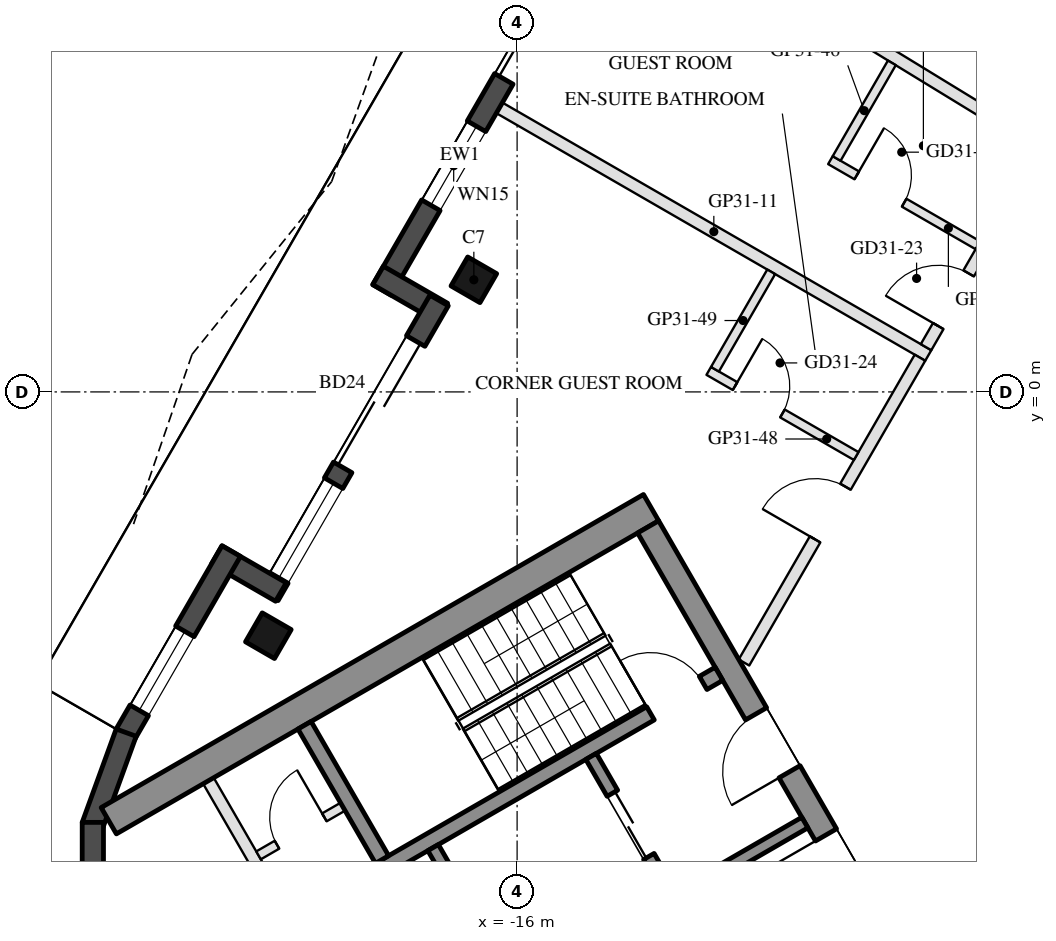
"""IFC4 building model, lengths in metres.
Left out: names, types, materials, properties, quantities, classifications, styles, units other than length and angle.
Written with IfcOpenShell. Run it as: python <this file> out.ifc"""

import sys

from ifc_helpers import new_model, si_unit, direction, frame, frame_2d, origin, origin_2d, place, context, subcontext, project, spatial, rectangle, hollow_rectangle, extrude, boolean, halfspace, element, fill, save


model = new_model("IFC4")
c1 = context("Model", 3, precision=1e-05, world=origin(), true_north=direction((0.0, 1.0)))
c2 = subcontext(c1, "Body", "Model", "MODEL_VIEW")
j1 = project(units=[si_unit("LENGTHUNIT", "METRE"), si_unit("PLANEANGLEUNIT", "RADIAN")], contexts=[c1])
p1 = place(None, origin())
s1 = spatial("IfcSite", under=j1, at=p1, CompositionType="ELEMENT")
p2 = place(p1, origin())
s2 = spatial("IfcBuilding", under=s1, at=p2, CompositionType="ELEMENT")
p3 = place(p2, frame((0.0, 0.0, 302.2)))
s3 = spatial("IfcBuildingStorey", under=s2, at=p3, CompositionType="ELEMENT", Elevation=302.2)
p4 = place(p3, frame((-16.711, 1.844, 0.0), z_axis=(0.0, 0.0, 1.0), x_axis=(0.5, 0.866025403784, 0.0)))
e1 = element("IfcColumn", 1, at=p4, inside=s3, PredefinedType="COLUMN", context=c2, shape_type="SweptSolid", body=[
    boolean("DIFFERENCE", extrude(hollow_rectangle(XDim=0.55, YDim=0.55, WallThickness=0.025, at=origin_2d()), origin(), (0.0, 0.0, 1.0), 3.7), halfspace(frame((0.0, 0.0, 0.034), z_axis=(0.0, 0.0, 1.0), x_axis=(1.0, 0.0, 0.0)), True)),
])
p5 = place(p3, frame((-20.091, -4.01, 0.0), z_axis=(0.0, 0.0, 1.0), x_axis=(0.5, 0.866025403784, 0.0)))
e2 = element("IfcColumn", 2, at=p5, inside=s3, PredefinedType="COLUMN", context=c2, shape_type="SweptSolid", body=[
    boolean("DIFFERENCE", extrude(hollow_rectangle(XDim=0.55, YDim=0.55, WallThickness=0.025, at=origin_2d()), origin(), (0.0, 0.0, 1.0), 3.7), halfspace(frame((0.0, 0.0, 0.04), z_axis=(0.0, 0.0, 1.0), x_axis=(1.0, 0.0, 0.0)), True)),
])
p6 = place(p3, frame((-13.943, 9.089, 0.0), z_axis=(0.0, 0.0, 1.0), x_axis=(-0.500013816581, -0.866017426631, 0.0)))
e3 = element("IfcWall", 3, at=p6, inside=s3, PredefinedType="SOLIDWALL", context=c2, shape_type="SweptSolid", body=[
    extrude(rectangle(XDim=8.559, YDim=0.35, at=frame_2d((4.279, 0.0))), origin(), (0.0, 0.0, 1.0), 3.55),
])
p7 = place(p6, frame((2.75, 0.0, 0.0)))
e4 = element("IfcOpeningElement", 4, at=p7, cuts=e3, PredefinedType="OPENING", context=c2, shape_type="SweptSolid", body=[
    extrude(rectangle(XDim=1.8, YDim=2.4, at=frame_2d((0.9, 1.2))), frame((0.0, 0.185, 0.0), z_axis=(0.0, -1.0, 0.0), x_axis=(1.0, 0.0, 0.0)), (0.0, 0.0, 1.0), 0.37),
])
p8 = place(p6, frame((1.525, 0.0, 0.3)))
e5 = element("IfcOpeningElement", 5, at=p8, cuts=e3, PredefinedType="OPENING", context=c2, shape_type="SweptSolid", body=[
    extrude(rectangle(XDim=0.9, YDim=2.65, at=frame_2d((0.45, 1.325))), frame((0.0, 0.185, 0.0), z_axis=(0.0, -1.0, 0.0), x_axis=(1.0, 0.0, 0.0)), (0.0, 0.0, 1.0), 0.37),
])
p9 = place(p6, frame((5.45, 0.0, 0.3)))
e6 = element("IfcOpeningElement", 6, at=p9, cuts=e3, PredefinedType="OPENING", context=c2, shape_type="SweptSolid", body=[
    extrude(rectangle(XDim=1.5, YDim=2.65, at=frame_2d((0.75, 1.325))), frame((0.0, 0.185, 0.0), z_axis=(0.0, -1.0, 0.0), x_axis=(1.0, 0.0, 0.0)), (0.0, 0.0, 1.0), 0.37),
])
p10 = place(p3, frame((-18.287, 1.916, 0.0), z_axis=(0.0, 0.0, 1.0), x_axis=(0.866142280446, -0.499797509021, 0.0)))
e7 = element("IfcWall", 7, at=p10, inside=s3, PredefinedType="SOLIDWALL", context=c2, shape_type="SweptSolid", body=[
    extrude(rectangle(XDim=1.22, YDim=0.35, at=frame_2d((0.61, 0.0))), origin(), (0.0, 0.0, 1.0), 3.55),
])
p11 = place(p3, frame((-17.283, 1.504, 0.0), z_axis=(0.0, 0.0, 1.0), x_axis=(-0.500008054862, -0.866020753258, 0.0)))
e8 = element("IfcWall", 8, at=p11, inside=s3, PredefinedType="SOLIDWALL", context=c2, shape_type="SweptSolid", body=[
    extrude(rectangle(XDim=5.599, YDim=0.35, at=frame_2d((2.8, 0.0))), origin(), (0.0, 0.0, 1.0), 3.55),
])
p12 = place(p11, frame((0.77, 0.0, 0.0)))
e9 = element("IfcOpeningElement", 9, at=p12, cuts=e8, PredefinedType="OPENING", context=c2, shape_type="SweptSolid", body=[
    extrude(rectangle(XDim=2.4, YDim=2.4, at=frame_2d((1.2, 1.2))), frame((0.0, 0.185, 0.0), z_axis=(0.0, -1.0, 0.0), x_axis=(1.0, 0.0, 0.0)), (0.0, 0.0, 1.0), 0.37),
])
p13 = place(p11, frame((3.47, 0.0, 0.3)))
e10 = element("IfcOpeningElement", 10, at=p13, cuts=e8, PredefinedType="OPENING", context=c2, shape_type="SweptSolid", body=[
    extrude(rectangle(XDim=1.8, YDim=2.65, at=frame_2d((0.9, 1.325))), frame((0.0, 0.185, 0.0), z_axis=(0.0, -1.0, 0.0), x_axis=(1.0, 0.0, 0.0)), (0.0, 0.0, 1.0), 0.37),
])
p14 = place(p3, frame((-19.884, -3.292, 0.0), z_axis=(0.0, 0.0, 1.0), x_axis=(-0.866005645448, 0.500034220881, 0.0)))
e11 = element("IfcWall", 11, at=p14, inside=s3, PredefinedType="SOLIDWALL", context=c2, shape_type="SweptSolid", body=[
    extrude(rectangle(XDim=1.22, YDim=0.35, at=frame_2d((0.61, 0.0))), origin(), (0.0, 0.0, 1.0), 3.55),
])
p15 = place(p3, frame((-20.702, -2.618, 0.0), z_axis=(0.0, 0.0, 1.0), x_axis=(-0.499979528911, -0.866037222451, 0.0)))
e12 = element("IfcWall", 12, at=p15, inside=s3, PredefinedType="SOLIDWALL", context=c2, shape_type="SweptSolid", body=[
    extrude(rectangle(XDim=3.48, YDim=0.35, at=frame_2d((1.74, 0.0))), origin(), (0.0, 0.0, 1.0), 3.55),
])
p16 = place(p15, frame((1.525, 0.0, 0.3)))
e13 = element("IfcOpeningElement", 13, at=p16, cuts=e12, PredefinedType="OPENING", context=c2, shape_type="SweptSolid", body=[
    extrude(rectangle(XDim=1.5, YDim=2.65, at=frame_2d((0.75, 1.325))), frame((0.0, 0.185, 0.0), z_axis=(0.0, -1.0, 0.0), x_axis=(1.0, 0.0, 0.0)), (0.0, 0.0, 1.0), 0.37),
])
for number, where, z_axis, x_axis in (
    (14, (-22.429, -5.604, 0.0), (0.0, 0.0, 1.0), (-0.342, -0.94, 0.0)),
    (15, (-22.977, -7.08, 0.0), (0.0, 0.0, 1.0), (0.0, -1.0, 0.0)),
):
    element("IfcWall", number, at=place(p3, frame(where, z_axis=z_axis, x_axis=x_axis)), inside=s3, PredefinedType="SOLIDWALL", context=c2, shape_type="SweptSolid", body=[
        extrude(rectangle(XDim=1.634, YDim=0.35, at=frame_2d((0.817, 0.0))), origin(), (0.0, 0.0, 1.0), 3.55),
    ])
p17 = place(p3, frame((-13.797, -1.903, 0.0), z_axis=(0.0, 0.0, 1.0), x_axis=(-0.866027279078, -0.499996751883, 0.0)))
e16 = element("IfcWall", 16, at=p17, inside=s3, PredefinedType="SHEAR", context=c2, shape_type="SweptSolid", body=[
    extrude(rectangle(XDim=10.298, YDim=0.5, at=frame_2d((5.149, 0.0))), origin(), (0.0, 0.0, 1.0), 3.5),
])
p18 = place(p3, frame((-13.845, -2.22, 0.0), z_axis=(0.0, 0.0, 1.0), x_axis=(0.500004234368, -0.866022959057, 0.0)))
e17 = element("IfcWall", 17, at=p18, inside=s3, PredefinedType="SHEAR", context=c2, shape_type="SweptSolid", body=[
    extrude(rectangle(XDim=10.0, YDim=0.4, at=frame_2d((5.0, 0.0))), origin(), (0.0, 0.0, 1.0), 3.5),
])
p19 = place(p18, frame((3.55, 0.0, 0.0)))
e18 = element("IfcOpeningElement", 18, at=p19, cuts=e17, PredefinedType="OPENING", context=c2, shape_type="SweptSolid", body=[
    extrude(rectangle(XDim=1.1, YDim=2.1, at=frame_2d((0.55, 1.05))), frame((0.0, 0.21, 0.0), z_axis=(0.0, -1.0, 0.0), x_axis=(1.0, 0.0, 0.0)), (0.0, 0.0, 1.0), 0.42),
])
p20 = place(p18, frame((5.85, 0.0, 0.0)))
e19 = element("IfcOpeningElement", 19, at=p20, cuts=e17, PredefinedType="OPENING", context=c2, shape_type="SweptSolid", body=[
    extrude(rectangle(XDim=1.4, YDim=2.1, at=frame_2d((0.7, 1.05))), frame((0.0, 0.21, 0.0), z_axis=(0.0, -1.0, 0.0), x_axis=(1.0, 0.0, 0.0)), (0.0, 0.0, 1.0), 0.42),
])
p21 = place(p3, frame((-12.681, -4.636, 0.0), z_axis=(0.0, 0.0, 1.0), x_axis=(-0.866021702275, -0.500006411147, 0.0)))
e20 = element("IfcWall", 20, at=p21, inside=s3, PredefinedType="SHEAR", context=c2, shape_type="SweptSolid", body=[
    extrude(rectangle(XDim=6.45, YDim=0.25, at=frame_2d((3.225, 0.0))), origin(), (0.0, 0.0, 1.0), 3.5),
])
p22 = place(p21, frame((0.3, 0.0, 0.0)))
e21 = element("IfcOpeningElement", 21, at=p22, cuts=e20, PredefinedType="OPENING", context=c2, shape_type="SweptSolid", body=[
    extrude(rectangle(XDim=1.0, YDim=2.1, at=frame_2d((0.5, 1.05))), frame((0.0, 0.135, 0.0), z_axis=(0.0, -1.0, 0.0), x_axis=(1.0, 0.0, 0.0)), (0.0, 0.0, 1.0), 0.27),
])
p23 = place(p3, frame((-19.496, -5.482, 0.0), z_axis=(0.0, 0.0, 1.0), x_axis=(0.499990435942, -0.866030925526, 0.0)))
e22 = element("IfcWall", 22, at=p23, inside=s3, PredefinedType="SHEAR", context=c2, shape_type="SweptSolid", body=[
    extrude(rectangle(XDim=2.55, YDim=0.25, at=frame_2d((1.275, 0.0))), origin(), (0.0, 0.0, 1.0), 3.5),
])
p24 = place(p3, frame((-17.381, -7.495, 0.0), z_axis=(0.0, 0.0, 1.0), x_axis=(0.500011755427, -0.866018616679, 0.0)))
e23 = element("IfcWall", 23, at=p24, inside=s3, PredefinedType="SHEAR", context=c2, shape_type="SweptSolid", body=[
    extrude(rectangle(XDim=2.8, YDim=0.2, at=frame_2d((1.4, 0.0))), origin(), (0.0, 0.0, 1.0), 3.5),
])
p25 = place(p3, frame((-14.783, -5.995, 0.0), z_axis=(0.0, 0.0, 1.0), x_axis=(0.49994636267, -0.866056369097, 0.0)))
e24 = element("IfcWall", 24, at=p25, inside=s3, PredefinedType="SHEAR", context=c2, shape_type="SweptSolid", body=[
    extrude(rectangle(XDim=2.8, YDim=0.2, at=frame_2d((1.4, 0.0))), origin(), (0.0, 0.0, 1.0), 3.5),
])
p26 = place(p25, frame((0.7, 0.0, 0.0)))
e25 = element("IfcOpeningElement", 25, at=p26, cuts=e24, PredefinedType="OPENING", context=c2, shape_type="SweptSolid", body=[
    extrude(rectangle(XDim=1.2, YDim=2.1, at=frame_2d((0.6, 1.05))), frame((0.0, 0.11, 0.0), z_axis=(0.0, -1.0, 0.0), x_axis=(1.0, 0.0, 0.0)), (0.0, 0.0, 1.0), 0.22),
])
p27 = place(p3, frame((-11.268, -7.083, 0.0), z_axis=(0.0, 0.0, 1.0), x_axis=(-0.866050077142, -0.499957262057, 0.0)))
e26 = element("IfcWall", 26, at=p27, inside=s3, PredefinedType="SHEAR", context=c2, shape_type="SweptSolid", body=[
    extrude(rectangle(XDim=2.4, YDim=0.2, at=frame_2d((1.2, 0.0))), origin(), (0.0, 0.0, 1.0), 3.5),
])
p28 = place(p3, frame((-21.076, -6.395, 0.0), z_axis=(0.0, 0.0, 1.0), x_axis=(0.50001468107, -0.866016927499, 0.0)))
e27 = element("IfcWall", 27, at=p28, inside=s3, PredefinedType="PARTITIONING", context=c2, shape_type="SweptSolid", body=[
    extrude(rectangle(XDim=5.4, YDim=0.2, at=frame_2d((2.7, 0.0))), origin(), (0.0, 0.0, 1.0), 3.5),
])
p29 = place(p28, frame((2.9, 0.0, 0.0)))
e28 = element("IfcOpeningElement", 28, at=p29, cuts=e27, PredefinedType="OPENING", context=c2, shape_type="SweptSolid", body=[
    extrude(rectangle(XDim=0.9, YDim=2.1, at=frame_2d((0.45, 1.05))), frame((0.0, 0.11, 0.0), z_axis=(0.0, -1.0, 0.0), x_axis=(1.0, 0.0, 0.0)), (0.0, 0.0, 1.0), 0.22),
])
p30 = place(p3, frame((-18.866, -6.822, 0.0), z_axis=(0.0, 0.0, 1.0), x_axis=(-0.866028054938, -0.499995408039, 0.0)))
e29 = element("IfcWall", 29, at=p30, inside=s3, PredefinedType="PARTITIONING", context=c2, shape_type="SweptSolid", body=[
    extrude(rectangle(XDim=1.6, YDim=0.15, at=frame_2d((0.8, 0.0))), origin(), (0.0, 0.0, 1.0), 3.5),
])
p31 = place(p30, frame((0.35, 0.0, 0.0)))
e30 = element("IfcOpeningElement", 30, at=p31, cuts=e29, PredefinedType="OPENING", context=c2, shape_type="SweptSolid", body=[
    extrude(rectangle(XDim=0.9, YDim=2.1, at=frame_2d((0.45, 1.05))), frame((0.0, 0.085, 0.0), z_axis=(0.0, -1.0, 0.0), x_axis=(1.0, 0.0, 0.0)), (0.0, 0.0, 1.0), 0.17),
])
p32 = place(p3, frame((-13.111, 7.531, 0.0), z_axis=(0.0, 0.0, 1.0), x_axis=(0.853158842711, -0.521651214034, 0.0)))
e31 = element("IfcWall", 31, at=p32, inside=s3, PredefinedType="PARTITIONING", context=c2, shape_type="SweptSolid", body=[
    extrude(rectangle(XDim=6.822, YDim=0.2, at=frame_2d((3.411, 0.0))), origin(), (0.0, 0.0, 1.0), 3.1),
])
p33 = place(p3, frame((-16.292, 4.672, 0.0), z_axis=(0.0, 0.0, 1.0), x_axis=(0.866028345359, -0.499994905008, 0.0)))
e32 = element("IfcWall", 32, at=p33, inside=s3, PredefinedType="PARTITIONING", context=c2, shape_type="SweptSolid", body=[
    extrude(rectangle(XDim=8.145, YDim=0.2, at=frame_2d((4.072, 0.0))), origin(), (0.0, 0.0, 1.0), 3.16),
])
p34 = place(p3, frame((-9.275, 0.736, 0.0), z_axis=(0.0, 0.0, 1.0), x_axis=(0.50002346599, 0.866011855265, 0.0)))
e33 = element("IfcWall", 33, at=p34, inside=s3, PredefinedType="PARTITIONING", context=c2, shape_type="SweptSolid", body=[
    extrude(rectangle(XDim=3.698, YDim=0.2, at=frame_2d((1.849, 0.0))), origin(), (0.0, 0.0, 1.0), 3.1),
])
p35 = place(p34, frame((0.401, 0.0, 0.0)))
e34 = element("IfcOpeningElement", 34, at=p35, cuts=e33, PredefinedType="OPENING", context=c2, shape_type="SweptSolid", body=[
    extrude(rectangle(XDim=1.0, YDim=2.1, at=frame_2d((0.5, 1.05))), frame((0.0, 0.11, 0.0), z_axis=(0.0, -1.0, 0.0), x_axis=(1.0, 0.0, 0.0)), (0.0, 0.0, 1.0), 0.22),
])
p36 = place(p3, frame((-10.847, 3.812, 0.0), z_axis=(0.0, 0.0, 1.0), x_axis=(0.865996816683, -0.500049511043, 0.0)))
e35 = element("IfcWall", 35, at=p36, inside=s3, PredefinedType="PARTITIONING", context=c2, shape_type="SweptSolid", body=[
    extrude(rectangle(XDim=2.8, YDim=0.15, at=frame_2d((1.4, 0.0))), origin(), (0.0, 0.0, 1.0), 3.55),
])
p37 = place(p36, frame((0.5, 0.0, 0.0)))
e36 = element("IfcOpeningElement", 36, at=p37, cuts=e35, PredefinedType="OPENING", context=c2, shape_type="SweptSolid", body=[
    extrude(rectangle(XDim=0.9, YDim=2.1, at=frame_2d((0.45, 1.05))), frame((0.0, 0.085, 0.0), z_axis=(0.0, -1.0, 0.0), x_axis=(1.0, 0.0, 0.0)), (0.0, 0.0, 1.0), 0.17),
])
p38 = place(p3, frame((-9.837, 5.412, 0.0), z_axis=(0.0, 0.0, 1.0), x_axis=(-0.499970715924, -0.866042310294, 0.0)))
e37 = element("IfcWall", 37, at=p38, inside=s3, PredefinedType="PARTITIONING", context=c2, shape_type="SweptSolid", body=[
    extrude(rectangle(XDim=1.816, YDim=0.15, at=frame_2d((0.908, 0.0))), origin(), (0.0, 0.0, 1.0), 3.55),
])
p39 = place(p3, frame((-12.269, -4.45, 0.0), z_axis=(0.0, 0.0, 1.0), x_axis=(0.50002670742, 0.866009983699, 0.0)))
e38 = element("IfcWall", 38, at=p39, inside=s3, PredefinedType="PARTITIONING", context=c2, shape_type="SweptSolid", body=[
    extrude(rectangle(XDim=5.788, YDim=0.2, at=frame_2d((2.894, 0.0))), origin(), (0.0, 0.0, 1.0), 3.1),
])
p40 = place(p39, frame((2.338, 0.0, 0.0)))
e39 = element("IfcOpeningElement", 39, at=p40, cuts=e38, PredefinedType="OPENING", context=c2, shape_type="SweptSolid", body=[
    extrude(rectangle(XDim=1.0, YDim=2.1, at=frame_2d((0.5, 1.05))), frame((0.0, 0.11, 0.0), z_axis=(0.0, -1.0, 0.0), x_axis=(1.0, 0.0, 0.0)), (0.0, 0.0, 1.0), 0.22),
])
p41 = place(p3, frame((-12.849, 0.346, 0.0), z_axis=(0.0, 0.0, 1.0), x_axis=(0.866018616679, -0.500011755427, 0.0)))
e40 = element("IfcWall", 40, at=p41, inside=s3, PredefinedType="PARTITIONING", context=c2, shape_type="SweptSolid", body=[
    extrude(rectangle(XDim=2.8, YDim=0.15, at=frame_2d((1.4, 0.0))), origin(), (0.0, 0.0, 1.0), 3.55),
])
p42 = place(p41, frame((0.5, 0.0, 0.0)))
e41 = element("IfcOpeningElement", 41, at=p42, cuts=e40, PredefinedType="OPENING", context=c2, shape_type="SweptSolid", body=[
    extrude(rectangle(XDim=0.9, YDim=2.1, at=frame_2d((0.45, 1.05))), frame((0.0, 0.085, 0.0), z_axis=(0.0, -1.0, 0.0), x_axis=(1.0, 0.0, 0.0)), (0.0, 0.0, 1.0), 0.17),
])
p43 = place(p3, frame((-11.821, 1.975, 0.0), z_axis=(0.0, 0.0, 1.0), x_axis=(-0.500042316284, -0.866000971088, 0.0)))
e42 = element("IfcWall", 42, at=p43, inside=s3, PredefinedType="PARTITIONING", context=c2, shape_type="SweptSolid", body=[
    extrude(rectangle(XDim=1.85, YDim=0.15, at=frame_2d((0.925, 0.0))), origin(), (0.0, 0.0, 1.0), 3.55),
])
p44 = place(p7, frame((1.8, 0.0, 0.0), z_axis=(0.0, 0.0, 1.0), x_axis=(-1.0, 0.0, 0.0)))
e43 = element("IfcDoor", 43, at=p44, inside=s3, OperationType="SLIDING_TO_LEFT", PredefinedType="DOOR", context=c2, shape_type="SweptSolid", body=[
    extrude(rectangle(XDim=1.8, YDim=2.4, at=frame_2d((0.9, 1.2))), frame((0.0, 0.025, 0.0), z_axis=(0.0, -1.0, 0.0), x_axis=(1.0, 0.0, 0.0)), (0.0, 0.0, 1.0), 0.05),
])
fill(e4, e43)
p45 = place(p9, origin())
e44 = element("IfcWindow", 44, at=p45, inside=s3, PartitioningType="SINGLE_PANEL", PredefinedType="WINDOW", context=c2, shape_type="SweptSolid", body=[
    extrude(rectangle(XDim=1.5, YDim=2.65, at=frame_2d((0.75, 1.325))), frame((0.0, 0.03, 0.0), z_axis=(0.0, -1.0, 0.0), x_axis=(1.0, 0.0, 0.0)), (0.0, 0.0, 1.0), 0.06),
])
fill(e6, e44)
p46 = place(p12, frame((2.4, 0.0, 0.0), z_axis=(0.0, 0.0, 1.0), x_axis=(-1.0, 0.0, 0.0)))
e45 = element("IfcDoor", 45, at=p46, inside=s3, OperationType="SLIDING_TO_LEFT", PredefinedType="DOOR", context=c2, shape_type="SweptSolid", body=[
    extrude(rectangle(XDim=2.4, YDim=2.4, at=frame_2d((1.2, 1.2))), frame((0.0, 0.025, 0.0), z_axis=(0.0, -1.0, 0.0), x_axis=(1.0, 0.0, 0.0)), (0.0, 0.0, 1.0), 0.05),
])
fill(e9, e45)
p47 = place(p13, origin())
e46 = element("IfcWindow", 46, at=p47, inside=s3, PartitioningType="SINGLE_PANEL", PredefinedType="WINDOW", context=c2, shape_type="SweptSolid", body=[
    extrude(rectangle(XDim=1.8, YDim=2.65, at=frame_2d((0.9, 1.325))), frame((0.0, 0.03, 0.0), z_axis=(0.0, -1.0, 0.0), x_axis=(1.0, 0.0, 0.0)), (0.0, 0.0, 1.0), 0.06),
])
fill(e10, e46)
p48 = place(p16, origin())
e47 = element("IfcWindow", 47, at=p48, inside=s3, PartitioningType="SINGLE_PANEL", PredefinedType="WINDOW", context=c2, shape_type="SweptSolid", body=[
    extrude(rectangle(XDim=1.5, YDim=2.65, at=frame_2d((0.75, 1.325))), frame((0.0, 0.03, 0.0), z_axis=(0.0, -1.0, 0.0), x_axis=(1.0, 0.0, 0.0)), (0.0, 0.0, 1.0), 0.06),
])
fill(e13, e47)
p49 = place(p26, origin())
e48 = element("IfcDoor", 48, at=p49, inside=s3, OperationType="DOUBLE_DOOR_SLIDING", PredefinedType="DOOR", context=c2, shape_type="SweptSolid", body=[
    extrude(rectangle(XDim=1.2, YDim=2.1, at=frame_2d((0.6, 1.05))), frame((0.0, 0.025, 0.0), z_axis=(0.0, -1.0, 0.0), x_axis=(1.0, 0.0, 0.0)), (0.0, 0.0, 1.0), 0.05),
])
fill(e25, e48)
p50 = place(p31, frame((0.9, 0.0, 0.0), z_axis=(0.0, 0.0, 1.0), x_axis=(-1.0, 0.0, 0.0)))
e49 = element("IfcDoor", 49, at=p50, inside=s3, OperationType="SINGLE_SWING_RIGHT", PredefinedType="DOOR", context=c2, shape_type="SweptSolid", body=[
    extrude(rectangle(XDim=0.9, YDim=2.1, at=frame_2d((0.45, 1.05))), frame((0.0, 0.025, 0.0), z_axis=(0.0, -1.0, 0.0), x_axis=(1.0, 0.0, 0.0)), (0.0, 0.0, 1.0), 0.05),
])
fill(e30, e49)
p51 = place(p19, frame((1.1, 0.0, 0.0), z_axis=(0.0, 0.0, 1.0), x_axis=(-1.0, 0.0, 0.0)))
e50 = element("IfcDoor", 50, at=p51, inside=s3, OperationType="SINGLE_SWING_LEFT", PredefinedType="DOOR", context=c2, shape_type="SweptSolid", body=[
    extrude(rectangle(XDim=1.1, YDim=2.1, at=frame_2d((0.55, 1.05))), frame((0.0, 0.025, 0.0), z_axis=(0.0, -1.0, 0.0), x_axis=(1.0, 0.0, 0.0)), (0.0, 0.0, 1.0), 0.05),
])
fill(e18, e50)
p52 = place(p20, frame((1.4, 0.0, 0.0), z_axis=(0.0, 0.0, 1.0), x_axis=(-1.0, 0.0, 0.0)))
e51 = element("IfcDoor", 51, at=p52, inside=s3, OperationType="DOUBLE_DOOR_SINGLE_SWING", PredefinedType="DOOR", context=c2, shape_type="SweptSolid", body=[
    extrude(rectangle(XDim=1.4, YDim=2.1, at=frame_2d((0.7, 1.05))), frame((0.0, 0.025, 0.0), z_axis=(0.0, -1.0, 0.0), x_axis=(1.0, 0.0, 0.0)), (0.0, 0.0, 1.0), 0.05),
])
fill(e19, e51)
p53 = place(p22, frame((1.0, 0.0, 0.0), z_axis=(0.0, 0.0, 1.0), x_axis=(-1.0, 0.0, 0.0)))
e52 = element("IfcDoor", 52, at=p53, inside=s3, OperationType="SINGLE_SWING_LEFT", PredefinedType="DOOR", context=c2, shape_type="SweptSolid", body=[
    extrude(rectangle(XDim=1.0, YDim=2.1, at=frame_2d((0.5, 1.05))), frame((0.0, 0.025, 0.0), z_axis=(0.0, -1.0, 0.0), x_axis=(1.0, 0.0, 0.0)), (0.0, 0.0, 1.0), 0.05),
])
fill(e21, e52)
p54 = place(p37, origin())
e53 = element("IfcDoor", 53, at=p54, inside=s3, OperationType="SINGLE_SWING_LEFT", PredefinedType="DOOR", context=c2, shape_type="SweptSolid", body=[
    extrude(rectangle(XDim=0.9, YDim=2.1, at=frame_2d((0.45, 1.05))), frame((0.0, 0.025, 0.0), z_axis=(0.0, -1.0, 0.0), x_axis=(1.0, 0.0, 0.0)), (0.0, 0.0, 1.0), 0.05),
])
fill(e36, e53)
p55 = place(p35, origin())
e54 = element("IfcDoor", 54, at=p55, inside=s3, OperationType="SINGLE_SWING_LEFT", PredefinedType="DOOR", context=c2, shape_type="SweptSolid", body=[
    extrude(rectangle(XDim=1.0, YDim=2.1, at=frame_2d((0.5, 1.05))), frame((0.0, 0.025, 0.0), z_axis=(0.0, -1.0, 0.0), x_axis=(1.0, 0.0, 0.0)), (0.0, 0.0, 1.0), 0.05),
])
fill(e34, e54)
p56 = place(p42, origin())
e55 = element("IfcDoor", 55, at=p56, inside=s3, OperationType="SINGLE_SWING_LEFT", PredefinedType="DOOR", context=c2, shape_type="SweptSolid", body=[
    extrude(rectangle(XDim=0.9, YDim=2.1, at=frame_2d((0.45, 1.05))), frame((0.0, 0.025, 0.0), z_axis=(0.0, -1.0, 0.0), x_axis=(1.0, 0.0, 0.0)), (0.0, 0.0, 1.0), 0.05),
])
fill(e41, e55)
p57 = place(p40, origin())
e56 = element("IfcDoor", 56, at=p57, inside=s3, OperationType="SINGLE_SWING_LEFT", PredefinedType="DOOR", context=c2, shape_type="SweptSolid", body=[
    extrude(rectangle(XDim=1.0, YDim=2.1, at=frame_2d((0.5, 1.05))), frame((0.0, 0.025, 0.0), z_axis=(0.0, -1.0, 0.0), x_axis=(1.0, 0.0, 0.0)), (0.0, 0.0, 1.0), 0.05),
])
fill(e39, e56)
save(model, sys.argv[1])
